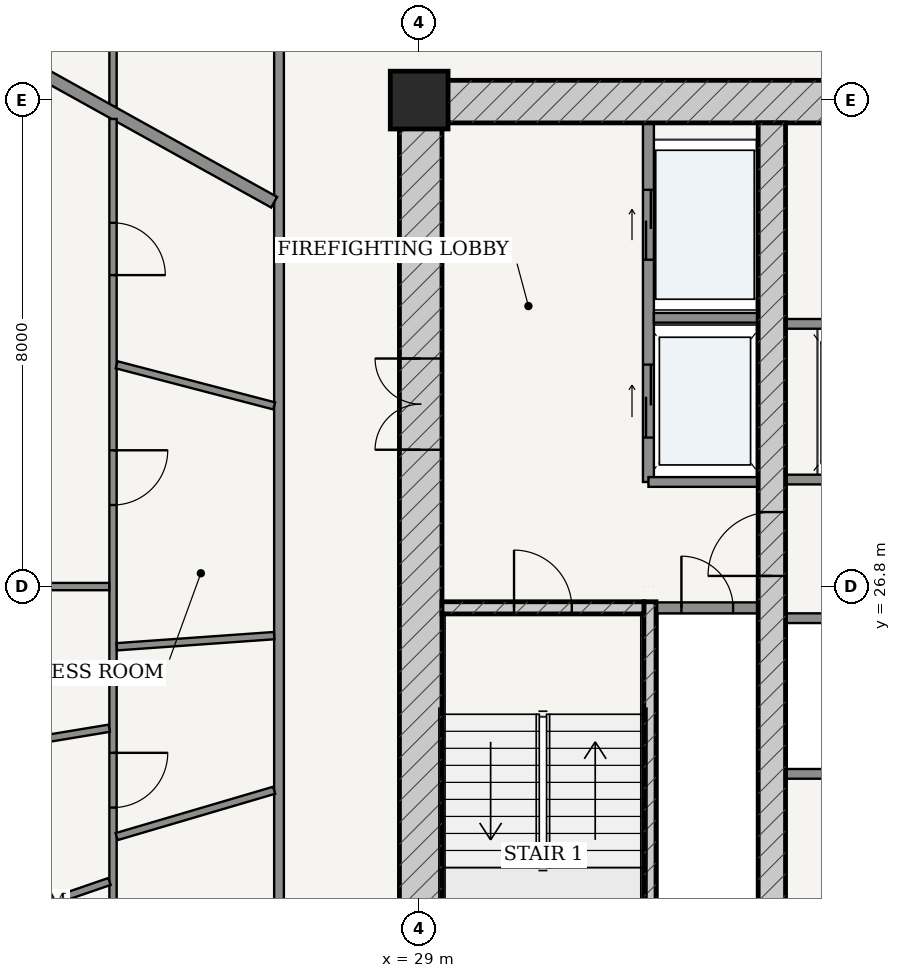
"""IFC4 building model, lengths in metres.
Left out: names, types, materials, properties, quantities, classifications, styles, units other than length and angle.
Written with IfcOpenShell. Run it as: python <this file> out.ifc"""

import sys

from ifc_helpers import new_model, si_unit, direction, frame, frame_2d, origin, origin_2d, place, context, subcontext, project, spatial, rectangle, extrude, source, transform, mapped, element, fill, save


model = new_model("IFC4")
c1 = context("Model", 3, precision=1e-05, world=origin(), true_north=direction((-0.2419218956, 0.970295726276)))
c2 = subcontext(c1, "Body", "Model", "MODEL_VIEW")
j1 = project(units=[si_unit("LENGTHUNIT", "METRE"), si_unit("PLANEANGLEUNIT", "RADIAN")], contexts=[c1])
p1 = place(None, origin())
s1 = spatial("IfcSite", under=j1, at=p1, CompositionType="ELEMENT")
p2 = place(p1, origin())
s2 = spatial("IfcBuilding", under=s1, at=p2, CompositionType="ELEMENT")
p3 = place(p2, frame((0.0, 0.0, 90.6)))
s3 = spatial("IfcBuildingStorey", under=s2, at=p3, CompositionType="ELEMENT", Elevation=90.6)
p4 = place(p3, frame((29.0, 34.8, 0.0), z_axis=(0.0, 0.0, 1.0), x_axis=(1.0, 0.0, 0.0)))
e1 = element("IfcColumn", 1, at=p4, inside=s3, PredefinedType="COLUMN", context=c2, shape_type="SweptSolid", body=[
    extrude(rectangle(XDim=0.95, YDim=0.95, at=origin_2d()), origin(), (0.0, 0.0, 1.0), 3.6),
])
p5 = place(p3, frame((28.675, 34.775, 0.0), z_axis=(0.0, 0.0, 1.0), x_axis=(1.0, 0.0, 0.0)))
e2 = element("IfcWall", 2, at=p5, inside=s3, PredefinedType="SHEAR", context=c2, shape_type="SweptSolid", body=[
    extrude(rectangle(XDim=18.65, YDim=0.7, at=frame_2d((9.325, 0.0))), origin(), (0.0, 0.0, 1.0), 3.325),
])
p6 = place(p5, frame((8.9, 0.0, 0.0)))
e3 = element("IfcOpeningElement", 3, at=p6, cuts=e2, PredefinedType="OPENING", context=c2, shape_type="SweptSolid", body=[
    extrude(rectangle(XDim=0.85, YDim=2.1, at=frame_2d((0.425, 1.05))), frame((0.0, 0.36, 0.0), z_axis=(0.0, -1.0, 0.0), x_axis=(1.0, 0.0, 0.0)), (0.0, 0.0, 1.0), 0.72),
])
p7 = place(p3, frame((29.025, 19.175, 0.0), z_axis=(0.0, 0.0, 1.0), x_axis=(0.0, 1.0, 0.0)))
e4 = element("IfcWall", 4, at=p7, inside=s3, PredefinedType="SHEAR", context=c2, shape_type="SweptSolid", body=[
    extrude(rectangle(XDim=15.25, YDim=0.7, at=frame_2d((7.625, 0.0))), origin(), (0.0, 0.0, 1.0), 3.325),
])
p8 = place(p7, frame((9.875, 0.0, 0.0)))
e5 = element("IfcOpeningElement", 5, at=p8, cuts=e4, PredefinedType="OPENING", context=c2, shape_type="SweptSolid", body=[
    extrude(rectangle(XDim=1.5, YDim=2.2, at=frame_2d((0.75, 1.1))), frame((0.0, 0.36, 0.0), z_axis=(0.0, -1.0, 0.0), x_axis=(1.0, 0.0, 0.0)), (0.0, 0.0, 1.0), 0.72),
])
p9 = place(p3, frame((32.795, 19.175, 0.0), z_axis=(0.0, 0.0, 1.0), x_axis=(0.0, 1.0, 0.0)))
e6 = element("IfcWall", 6, at=p9, inside=s3, PredefinedType="SOLIDWALL", context=c2, shape_type="SweptSolid", body=[
    extrude(rectangle(XDim=7.375, YDim=0.2, at=frame_2d((3.688, 0.0))), origin(), (0.0, 0.0, 1.0), 3.325),
])
p10 = place(p3, frame((29.375, 26.45, 0.0), z_axis=(0.0, 0.0, 1.0), x_axis=(1.0, 0.0, 0.0)))
e7 = element("IfcWall", 7, at=p10, inside=s3, PredefinedType="SOLIDWALL", context=c2, shape_type="SweptSolid", body=[
    extrude(rectangle(XDim=3.32, YDim=0.2, at=frame_2d((1.66, 0.0))), origin(), (0.0, 0.0, 1.0), 3.325),
])
p11 = place(p10, frame((1.185, 0.0, 0.0)))
e8 = element("IfcOpeningElement", 8, at=p11, cuts=e7, PredefinedType="OPENING", context=c2, shape_type="SweptSolid", body=[
    extrude(rectangle(XDim=0.95, YDim=2.15, at=frame_2d((0.475, 1.075))), frame((0.0, 0.11, 0.0), z_axis=(0.0, -1.0, 0.0), x_axis=(1.0, 0.0, 0.0)), (0.0, 0.0, 1.0), 0.22),
])
p12 = place(p3, frame((34.8, 19.175, 0.0), z_axis=(0.0, 0.0, 1.0), x_axis=(0.0, 1.0, 0.0)))
e9 = element("IfcWall", 9, at=p12, inside=s3, PredefinedType="SHEAR", context=c2, shape_type="SweptSolid", body=[
    extrude(rectangle(XDim=15.25, YDim=0.45, at=frame_2d((7.625, 0.0))), origin(), (0.0, 0.0, 1.0), 3.325),
])
p13 = place(p12, frame((7.8, 0.0, 0.0)))
e10 = element("IfcOpeningElement", 10, at=p13, cuts=e9, PredefinedType="OPENING", context=c2, shape_type="SweptSolid", body=[
    extrude(rectangle(XDim=1.05, YDim=2.15, at=frame_2d((0.525, 1.075))), frame((0.0, 0.235, 0.0), z_axis=(0.0, -1.0, 0.0), x_axis=(1.0, 0.0, 0.0)), (0.0, 0.0, 1.0), 0.47),
])
p14 = place(p3, frame((32.9, 26.45, 0.0), z_axis=(0.0, 0.0, 1.0), x_axis=(1.0, 0.0, 0.0)))
e11 = element("IfcWall", 11, at=p14, inside=s3, PredefinedType="PARTITIONING", context=c2, shape_type="SweptSolid", body=[
    extrude(rectangle(XDim=1.675, YDim=0.18, at=frame_2d((0.837, 0.0))), origin(), (0.0, 0.0, 1.0), 3.325),
])
p15 = place(p14, frame((0.413, 0.0, 0.0)))
e12 = element("IfcOpeningElement", 12, at=p15, cuts=e11, PredefinedType="OPENING", context=c2, shape_type="SweptSolid", body=[
    extrude(rectangle(XDim=0.85, YDim=2.1, at=frame_2d((0.425, 1.05))), frame((0.0, 0.1, 0.0), z_axis=(0.0, -1.0, 0.0), x_axis=(1.0, 0.0, 0.0)), (0.0, 0.0, 1.0), 0.2),
])
p16 = place(p3, frame((32.77, 28.52, 0.0), z_axis=(0.0, 0.0, 1.0), x_axis=(0.0, 1.0, 0.0)))
e13 = element("IfcWall", 13, at=p16, inside=s3, PredefinedType="PARTITIONING", context=c2, shape_type="SweptSolid", body=[
    extrude(rectangle(XDim=5.905, YDim=0.18, at=frame_2d((2.953, 0.0))), origin(), (0.0, 0.0, 1.0), 3.325),
])
p17 = place(p16, frame((3.655, 0.0, 0.0)))
e14 = element("IfcOpeningElement", 14, at=p17, cuts=e13, PredefinedType="OPENING", context=c2, shape_type="SweptSolid", body=[
    extrude(rectangle(XDim=1.15, YDim=2.2, at=frame_2d((0.575, 1.1))), frame((0.0, 0.1, 0.0), z_axis=(0.0, -1.0, 0.0), x_axis=(1.0, 0.0, 0.0)), (0.0, 0.0, 1.0), 0.2),
])
p18 = place(p16, frame((0.73, 0.0, 0.0)))
e15 = element("IfcOpeningElement", 15, at=p18, cuts=e13, PredefinedType="OPENING", context=c2, shape_type="SweptSolid", body=[
    extrude(rectangle(XDim=1.2, YDim=2.25, at=frame_2d((0.6, 1.125))), frame((0.0, 0.1, 0.0), z_axis=(0.0, -1.0, 0.0), x_axis=(1.0, 0.0, 0.0)), (0.0, 0.0, 1.0), 0.2),
])
p19 = place(p3, frame((32.86, 31.22, 0.0), z_axis=(0.0, 0.0, 1.0), x_axis=(1.0, 0.0, 0.0)))
e16 = element("IfcWall", 16, at=p19, inside=s3, PredefinedType="PARTITIONING", context=c2, shape_type="SweptSolid", body=[
    extrude(rectangle(XDim=1.715, YDim=0.16, at=frame_2d((0.857, 0.0))), origin(), (0.0, 0.0, 1.0), 3.325),
])
p20 = place(p3, frame((32.77, 28.52, 0.0), z_axis=(0.0, 0.0, 1.0), x_axis=(1.0, 0.0, 0.0)))
e17 = element("IfcWall", 17, at=p20, inside=s3, PredefinedType="PARTITIONING", context=c2, shape_type="SweptSolid", body=[
    extrude(rectangle(XDim=1.805, YDim=0.16, at=frame_2d((0.902, 0.0))), origin(), (0.0, 0.0, 1.0), 3.325),
])
p21 = place(p3, frame((35.025, 28.56, 0.0), z_axis=(0.0, 0.0, 1.0), x_axis=(1.0, 0.0, 0.0)))
e18 = element("IfcWall", 18, at=p21, inside=s3, PredefinedType="PARTITIONING", context=c2, shape_type="SweptSolid", body=[
    extrude(rectangle(XDim=5.95, YDim=0.16, at=frame_2d((2.975, 0.0))), origin(), (0.0, 0.0, 1.0), 3.325),
])
p22 = place(p21, frame((0.76, 0.0, 0.0)))
e19 = element("IfcOpeningElement", 19, at=p22, cuts=e18, PredefinedType="OPENING", context=c2, shape_type="SweptSolid", body=[
    extrude(rectangle(XDim=1.1, YDim=2.2, at=frame_2d((0.55, 1.1))), frame((0.0, 0.09, 0.0), z_axis=(0.0, -1.0, 0.0), x_axis=(1.0, 0.0, 0.0)), (0.0, 0.0, 1.0), 0.18),
])
p23 = place(p21, frame((2.425, 0.0, 0.0)))
e20 = element("IfcOpeningElement", 20, at=p23, cuts=e18, PredefinedType="OPENING", context=c2, shape_type="SweptSolid", body=[
    extrude(rectangle(XDim=1.1, YDim=2.2, at=frame_2d((0.55, 1.1))), frame((0.0, 0.09, 0.0), z_axis=(0.0, -1.0, 0.0), x_axis=(1.0, 0.0, 0.0)), (0.0, 0.0, 1.0), 0.18),
])
p24 = place(p21, frame((4.09, 0.0, 0.0)))
e21 = element("IfcOpeningElement", 21, at=p24, cuts=e18, PredefinedType="OPENING", context=c2, shape_type="SweptSolid", body=[
    extrude(rectangle(XDim=1.1, YDim=2.2, at=frame_2d((0.55, 1.1))), frame((0.0, 0.09, 0.0), z_axis=(0.0, -1.0, 0.0), x_axis=(1.0, 0.0, 0.0)), (0.0, 0.0, 1.0), 0.18),
])
for number, where, z_axis, x_axis in (
    (22, (35.025, 31.12, 0.0), (0.0, 0.0, 1.0), (1.0, 0.0, 0.0)),
    (23, (35.025, 26.28, 0.0), (0.0, 0.0, 1.0), (1.0, 0.0, 0.0)),
    (24, (35.025, 23.72, 0.0), (0.0, 0.0, 1.0), (1.0, 0.0, 0.0)),
):
    element("IfcWall", number, at=place(p3, frame(where, z_axis=z_axis, x_axis=x_axis)), inside=s3, PredefinedType="PARTITIONING", context=c2, shape_type="SweptSolid", body=[
        extrude(rectangle(XDim=5.95, YDim=0.16, at=frame_2d((2.975, 0.0))), origin(), (0.0, 0.0, 1.0), 3.325),
    ])
p25 = place(p3, frame((26.695, 16.575, 0.0), z_axis=(0.0, 0.0, 1.0), x_axis=(0.0, 1.0, 0.0)))
e25 = element("IfcWall", 25, at=p25, inside=s3, PredefinedType="PARTITIONING", context=c2, shape_type="SweptSolid", body=[
    extrude(rectangle(XDim=20.45, YDim=0.16, at=frame_2d((10.225, 0.0))), origin(), (0.0, 0.0, 1.0), 2.767),
])
p26 = place(p3, frame((23.965, 34.693, 0.0), z_axis=(0.0, 0.0, 1.0), x_axis=(0.0, 1.0, 0.0)))
e26 = element("IfcWall", 26, at=p26, inside=s3, PredefinedType="PARTITIONING", context=c2, shape_type="SweptSolid", body=[
    extrude(rectangle(XDim=5.142, YDim=0.12, at=frame_2d((2.571, 0.0))), origin(), (0.0, 0.0, 1.0), 3.004),
])
p27 = place(p3, frame((26.615, 33.12, 0.0), z_axis=(0.0, 0.0, 1.0), x_axis=(-0.874319192772, 0.485351366692, 0.0)))
e27 = element("IfcWall", 27, at=p27, inside=s3, PredefinedType="PARTITIONING", context=c2, shape_type="SweptSolid", body=[
    extrude(rectangle(XDim=12.158, YDim=0.2, at=frame_2d((6.079, 0.0))), origin(), (0.0, 0.0, 1.0), 2.767),
])
p28 = place(p3, frame((23.965, 13.765, 0.0), z_axis=(0.0, 0.0, 1.0), x_axis=(0.0, 1.0, 0.0)))
e28 = element("IfcWall", 28, at=p28, inside=s3, PredefinedType="PARTITIONING", context=c2, shape_type="SweptSolid", body=[
    extrude(rectangle(XDim=20.725, YDim=0.12, at=frame_2d((10.362, 0.0))), origin(), (0.0, 0.0, 1.0), 2.767),
])
p29 = place(p28, frame((9.401, 0.0, 0.0)))
e29 = element("IfcOpeningElement", 29, at=p29, cuts=e28, PredefinedType="OPENING", context=c2, shape_type="SweptSolid", body=[
    extrude(rectangle(XDim=0.9, YDim=2.15, at=frame_2d((0.45, 1.075))), frame((0.0, 0.07, 0.0), z_axis=(0.0, -1.0, 0.0), x_axis=(1.0, 0.0, 0.0)), (0.0, 0.0, 1.0), 0.14),
])
p30 = place(p28, frame((18.157, 0.0, 0.0)))
e30 = element("IfcOpeningElement", 30, at=p30, cuts=e28, PredefinedType="OPENING", context=c2, shape_type="SweptSolid", body=[
    extrude(rectangle(XDim=0.86, YDim=2.15, at=frame_2d((0.43, 1.075))), frame((0.0, 0.07, 0.0), z_axis=(0.0, -1.0, 0.0), x_axis=(1.0, 0.0, 0.0)), (0.0, 0.0, 1.0), 0.14),
])
p31 = place(p28, frame((14.376, 0.0, 0.0)))
e31 = element("IfcOpeningElement", 31, at=p31, cuts=e28, PredefinedType="OPENING", context=c2, shape_type="SweptSolid", body=[
    extrude(rectangle(XDim=0.9, YDim=2.15, at=frame_2d((0.45, 1.075))), frame((0.0, 0.07, 0.0), z_axis=(0.0, -1.0, 0.0), x_axis=(1.0, 0.0, 0.0)), (0.0, 0.0, 1.0), 0.14),
])
p32 = place(p3, frame((23.903, 26.8, 0.0), z_axis=(0.0, 0.0, 1.0), x_axis=(-1.0, 0.0, 0.0)))
e32 = element("IfcWall", 32, at=p32, inside=s3, PredefinedType="PARTITIONING", context=c2, shape_type="SweptSolid", body=[
    extrude(rectangle(XDim=12.443, YDim=0.12, at=frame_2d((6.222, 0.0))), origin(), (0.0, 0.0, 1.0), 2.767),
])
p33 = place(p32, frame((5.771, 0.0, 0.0)))
e33 = element("IfcOpeningElement", 33, at=p33, cuts=e32, PredefinedType="OPENING", context=c2, shape_type="SweptSolid", body=[
    extrude(rectangle(XDim=0.9, YDim=2.15, at=frame_2d((0.45, 1.075))), frame((0.0, 0.07, 0.0), z_axis=(0.0, -1.0, 0.0), x_axis=(1.0, 0.0, 0.0)), (0.0, 0.0, 1.0), 0.14),
])
p34 = place(p3, frame((23.904, 24.47, 0.0), z_axis=(0.0, 0.0, 1.0), x_axis=(-0.986618264768, -0.163047231274, 0.0)))
e34 = element("IfcWall", 34, at=p34, inside=s3, PredefinedType="PARTITIONING", context=c2, shape_type="SweptSolid", body=[
    extrude(rectangle(XDim=12.039, YDim=0.12, at=frame_2d((6.02, 0.0))), origin(), (0.0, 0.0, 1.0), 2.767),
])
p35 = place(p34, frame((4.496, 0.0, 0.0)))
e35 = element("IfcOpeningElement", 35, at=p35, cuts=e34, PredefinedType="OPENING", context=c2, shape_type="SweptSolid", body=[
    extrude(rectangle(XDim=0.9, YDim=2.15, at=frame_2d((0.45, 1.075))), frame((0.0, 0.07, 0.0), z_axis=(0.0, -1.0, 0.0), x_axis=(1.0, 0.0, 0.0)), (0.0, 0.0, 1.0), 0.14),
])
p36 = place(p3, frame((23.906, 21.95, 0.0), z_axis=(0.0, 0.0, 1.0), x_axis=(-0.945573120726, -0.32540970078, 0.0)))
e36 = element("IfcWall", 36, at=p36, inside=s3, PredefinedType="PARTITIONING", context=c2, shape_type="SweptSolid", body=[
    extrude(rectangle(XDim=11.022, YDim=0.12, at=frame_2d((5.511, 0.0))), origin(), (0.0, 0.0, 1.0), 2.767),
])
p37 = place(p36, frame((5.061, 0.0, 0.0)))
e37 = element("IfcOpeningElement", 37, at=p37, cuts=e36, PredefinedType="OPENING", context=c2, shape_type="SweptSolid", body=[
    extrude(rectangle(XDim=0.9, YDim=2.15, at=frame_2d((0.45, 1.075))), frame((0.0, 0.07, 0.0), z_axis=(0.0, -1.0, 0.0), x_axis=(1.0, 0.0, 0.0)), (0.0, 0.0, 1.0), 0.14),
])
p38 = place(p3, frame((26.615, 29.771, 0.0), z_axis=(0.0, 0.0, 1.0), x_axis=(-0.967585302816, 0.252544415449, 0.0)))
e38 = element("IfcWall", 38, at=p38, inside=s3, PredefinedType="PARTITIONING", context=c2, shape_type="SweptSolid", body=[
    extrude(rectangle(XDim=2.677, YDim=0.12, at=frame_2d((1.338, 0.0))), origin(), (0.0, 0.0, 1.0), 3.325),
])
p39 = place(p3, frame((26.615, 25.993, 0.0), z_axis=(0.0, 0.0, 1.0), x_axis=(-0.997500084777, -0.070665273433, 0.0)))
e39 = element("IfcWall", 39, at=p39, inside=s3, PredefinedType="PARTITIONING", context=c2, shape_type="SweptSolid", body=[
    extrude(rectangle(XDim=2.595, YDim=0.12, at=frame_2d((1.297, 0.0))), origin(), (0.0, 0.0, 1.0), 3.325),
])
p40 = place(p3, frame((26.615, 23.45, 0.0), z_axis=(0.0, 0.0, 1.0), x_axis=(-0.959338143787, -0.282259323806, 0.0)))
e40 = element("IfcWall", 40, at=p40, inside=s3, PredefinedType="PARTITIONING", context=c2, shape_type="SweptSolid", body=[
    extrude(rectangle(XDim=2.7, YDim=0.12, at=frame_2d((1.35, 0.0))), origin(), (0.0, 0.0, 1.0), 3.325),
])
m1 = source(origin(), c2, "Body", "SweptSolid", [
    extrude(rectangle(XDim=1.5, YDim=2.2, at=frame_2d((0.75, 1.1))), frame((0.0, 0.025, 0.0), z_axis=(0.0, -1.0, 0.0), x_axis=(1.0, 0.0, 0.0)), (0.0, 0.0, 1.0), 0.05),
])
p41 = place(p8, origin())
e41 = element("IfcDoor", 41, at=p41, inside=s3, OperationType="DOUBLE_DOOR_SINGLE_SWING", PredefinedType="DOOR", context=c2, shape_type="MappedRepresentation", body=[
    mapped(m1, transform((0.0, 0.0, 0.0), scale=1.0)),
])
fill(e5, e41)
m2 = source(origin(), c2, "Body", "SweptSolid", [
    extrude(rectangle(XDim=1.05, YDim=2.15, at=frame_2d((0.525, 1.075))), frame((0.0, 0.025, 0.0), z_axis=(0.0, -1.0, 0.0), x_axis=(1.0, 0.0, 0.0)), (0.0, 0.0, 1.0), 0.05),
])
p42 = place(p13, origin())
e42 = element("IfcDoor", 42, at=p42, inside=s3, OperationType="SINGLE_SWING_LEFT", PredefinedType="DOOR", context=c2, shape_type="MappedRepresentation", body=[
    mapped(m2, transform((0.0, 0.0, 0.0), scale=1.0)),
])
fill(e10, e42)
m3 = source(origin(), c2, "Body", "SweptSolid", [
    extrude(rectangle(XDim=0.95, YDim=2.15, at=frame_2d((0.475, 1.075))), frame((0.0, 0.025, 0.0), z_axis=(0.0, -1.0, 0.0), x_axis=(1.0, 0.0, 0.0)), (0.0, 0.0, 1.0), 0.05),
])
p43 = place(p11, origin())
e43 = element("IfcDoor", 43, at=p43, inside=s3, OperationType="SINGLE_SWING_LEFT", PredefinedType="DOOR", context=c2, shape_type="MappedRepresentation", body=[
    mapped(m3, transform((0.0, 0.0, 0.0), scale=1.0)),
])
fill(e8, e43)
m4 = source(origin(), c2, "Body", "SweptSolid", [
    extrude(rectangle(XDim=0.85, YDim=2.1, at=frame_2d((0.425, 1.05))), frame((0.0, 0.025, 0.0), z_axis=(0.0, -1.0, 0.0), x_axis=(1.0, 0.0, 0.0)), (0.0, 0.0, 1.0), 0.05),
])
p44 = place(p15, origin())
e44 = element("IfcDoor", 44, at=p44, inside=s3, OperationType="SINGLE_SWING_LEFT", PredefinedType="DOOR", context=c2, shape_type="MappedRepresentation", body=[
    mapped(m4, transform((0.0, 0.0, 0.0), scale=1.0)),
])
fill(e12, e44)
m5 = source(origin(), c2, "Body", "SweptSolid", [
    extrude(rectangle(XDim=1.15, YDim=2.2, at=frame_2d((0.575, 1.1))), frame((0.0, 0.025, 0.0), z_axis=(0.0, -1.0, 0.0), x_axis=(1.0, 0.0, 0.0)), (0.0, 0.0, 1.0), 0.05),
])
p45 = place(p17, origin())
e45 = element("IfcDoor", 45, at=p45, inside=s3, OperationType="DOUBLE_DOOR_SLIDING", PredefinedType="DOOR", context=c2, shape_type="MappedRepresentation", body=[
    mapped(m5, transform((0.0, 0.0, 0.0), scale=1.0)),
])
fill(e14, e45)
m6 = source(origin(), c2, "Body", "SweptSolid", [
    extrude(rectangle(XDim=1.2, YDim=2.25, at=frame_2d((0.6, 1.125))), frame((0.0, 0.025, 0.0), z_axis=(0.0, -1.0, 0.0), x_axis=(1.0, 0.0, 0.0)), (0.0, 0.0, 1.0), 0.05),
])
p46 = place(p18, origin())
e46 = element("IfcDoor", 46, at=p46, inside=s3, OperationType="DOUBLE_DOOR_SLIDING", PredefinedType="DOOR", context=c2, shape_type="MappedRepresentation", body=[
    mapped(m6, transform((0.0, 0.0, 0.0), scale=1.0)),
])
fill(e15, e46)
m7 = source(origin(), c2, "Body", "SweptSolid", [
    extrude(rectangle(XDim=0.9, YDim=2.15, at=frame_2d((0.45, 1.075))), frame((0.0, 0.025, 0.0), z_axis=(0.0, -1.0, 0.0), x_axis=(1.0, 0.0, 0.0)), (0.0, 0.0, 1.0), 0.05),
])
p47 = place(p29, frame((0.9, 0.0, 0.0), z_axis=(0.0, 0.0, 1.0), x_axis=(-1.0, 0.0, 0.0)))
e47 = element("IfcDoor", 47, at=p47, inside=s3, OperationType="SINGLE_SWING_LEFT", PredefinedType="DOOR", context=c2, shape_type="MappedRepresentation", body=[
    mapped(m7, transform((0.0, 0.0, 0.0), scale=1.0)),
])
fill(e29, e47)
m8 = source(origin(), c2, "Body", "SweptSolid", [
    extrude(rectangle(XDim=0.86, YDim=2.15, at=frame_2d((0.43, 1.075))), frame((0.0, 0.025, 0.0), z_axis=(0.0, -1.0, 0.0), x_axis=(1.0, 0.0, 0.0)), (0.0, 0.0, 1.0), 0.05),
])
p48 = place(p30, frame((0.86, 0.0, 0.0), z_axis=(0.0, 0.0, 1.0), x_axis=(-1.0, 0.0, 0.0)))
e48 = element("IfcDoor", 48, at=p48, inside=s3, OperationType="SINGLE_SWING_RIGHT", PredefinedType="DOOR", context=c2, shape_type="MappedRepresentation", body=[
    mapped(m8, transform((0.0, 0.0, 0.0), scale=1.0)),
])
fill(e30, e48)
p49 = place(p31, frame((0.9, 0.0, 0.0), z_axis=(0.0, 0.0, 1.0), x_axis=(-1.0, 0.0, 0.0)))
e49 = element("IfcDoor", 49, at=p49, inside=s3, OperationType="SINGLE_SWING_LEFT", PredefinedType="DOOR", context=c2, shape_type="MappedRepresentation", body=[
    mapped(m7, transform((0.0, 0.0, 0.0), scale=1.0)),
])
fill(e31, e49)
save(model, sys.argv[1])
